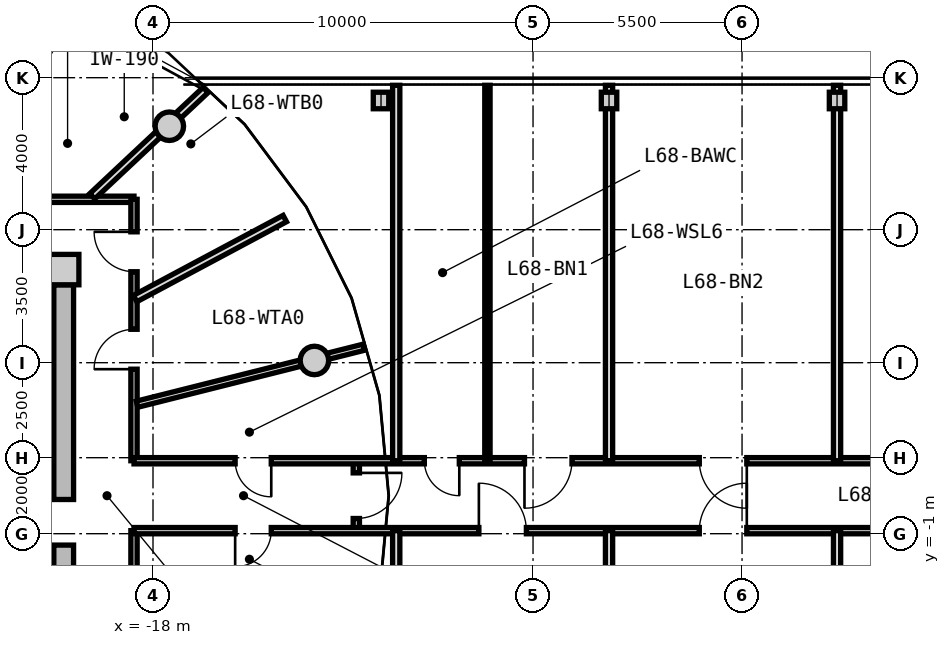
"""IFC4 building model, lengths in metres.
Left out: names, types, materials, properties, quantities, classifications, styles, units other than length and angle.
Written with IfcOpenShell. Run it as: python <this file> out.ifc"""

import sys

from ifc_helpers import new_model, si_unit, direction, frame, frame_2d, origin, origin_2d, place, context, subcontext, project, spatial, rectangle, circle, i_section, extrude, source, transform, mapped, element, fill, save


model = new_model("IFC4")
c1 = context("Model", 3, precision=1e-05, world=origin(), true_north=direction((0.0, 1.0)))
c2 = subcontext(c1, "Body", "Model", "MODEL_VIEW")
j1 = project(units=[si_unit("LENGTHUNIT", "METRE"), si_unit("PLANEANGLEUNIT", "RADIAN")], contexts=[c1])
p1 = place(None, origin())
s1 = spatial("IfcSite", under=j1, at=p1, CompositionType="ELEMENT")
p2 = place(p1, origin())
s2 = spatial("IfcBuilding", under=s1, at=p2, CompositionType="ELEMENT")
p3 = place(p2, frame((0.0, 0.0, 220.0)))
s3 = spatial("IfcBuildingStorey", under=s2, at=p3, CompositionType="ELEMENT", Elevation=220.0)
m1 = source(origin(), c2, "Body", "SweptSolid", [
    extrude(rectangle(XDim=0.8, YDim=0.8, at=origin_2d()), origin(), (0.0, 0.0, 1.0), 3.05),
])
p4 = place(p3, frame((-20.35, 5.95, 0.0), z_axis=(0.0, 0.0, 1.0), x_axis=(1.0, 0.0, 0.0)))
e1 = element("IfcColumn", 1, at=p4, inside=s3, PredefinedType="COLUMN", context=c2, shape_type="MappedRepresentation", body=[
    mapped(m1, transform((0.0, 0.0, 0.0), x_axis=(1.0, 0.0, 0.0), y_axis=(0.0, 1.0, 0.0), z_axis=(0.0, 0.0, 1.0), scale=1.0)),
])
m2 = source(origin(), c2, "Body", "SweptSolid", [
    extrude(rectangle(XDim=11.1, YDim=0.52, at=frame_2d((5.55, 0.0))), origin(), (0.0, 0.0, 1.0), 2.76),
])
p5 = place(p3, frame((-20.35, 5.55, 0.0), z_axis=(0.0, 0.0, 1.0), x_axis=(0.0, -1.0, 0.0)))
e2 = element("IfcWall", 2, at=p5, inside=s3, PredefinedType="SHEAR", context=c2, shape_type="MappedRepresentation", body=[
    mapped(m2, transform((0.0, 0.0, 0.0), x_axis=(1.0, 0.0, 0.0), y_axis=(0.0, 1.0, 0.0), z_axis=(0.0, 0.0, 1.0), scale=1.0)),
])
p6 = place(p5, frame((5.65, 0.0, 0.0)))
e3 = element("IfcOpeningElement", 3, at=p6, cuts=e2, PredefinedType="OPENING", context=c2, shape_type="SweptSolid", body=[
    extrude(rectangle(XDim=1.2, YDim=2.15, at=frame_2d((0.6, 1.075))), frame((0.0, 0.27, 0.0), z_axis=(0.0, -1.0, 0.0), x_axis=(1.0, 0.0, 0.0)), (0.0, 0.0, 1.0), 0.54),
])
m3 = source(origin(), c2, "Body", "SweptSolid", [
    extrude(circle(Radius=0.375, at=origin_2d()), origin(), (0.0, 0.0, 1.0), 3.05),
])
for number, where, z_axis, x_axis in (
    (4, (-13.753, 3.559, 0.0), (0.0, 0.0, 1.0), (1.0, 0.0, 0.0)),
    (5, (-17.57, 9.723, 0.0), (0.0, 0.0, 1.0), (1.0, 0.0, 0.0)),
):
    element("IfcColumn", number, at=place(p3, frame(where, z_axis=z_axis, x_axis=x_axis)), inside=s3, PredefinedType="COLUMN", context=c2, shape_type="MappedRepresentation", body=[
        mapped(m3, transform((0.0, 0.0, 0.0), x_axis=(1.0, 0.0, 0.0), y_axis=(0.0, 1.0, 0.0), z_axis=(0.0, 0.0, 1.0), scale=1.0)),
    ])
m4 = source(origin(), c2, "Body", "SweptSolid", [
    extrude(i_section(OverallWidth=0.407, OverallDepth=0.435, WebThickness=0.024, FlangeThickness=0.039, FilletRadius=0.015, at=origin_2d()), origin(), (0.0, 0.0, 1.0), 3.05),
])
for number, where, z_axis, x_axis in (
    (6, (-12.0, 10.4, 0.0), (0.0, 0.0, 1.0), (1.0, 0.0, 0.0)),
    (7, (-6.0, 10.4, 0.0), (0.0, 0.0, 1.0), (1.0, 0.0, 0.0)),
    (8, (0.0, 10.4, 0.0), (0.0, 0.0, 1.0), (1.0, 0.0, 0.0)),
):
    element("IfcColumn", number, at=place(p3, frame(where, z_axis=z_axis, x_axis=x_axis)), inside=s3, PredefinedType="COLUMN", context=c2, shape_type="MappedRepresentation", body=[
        mapped(m4, transform((0.0, 0.0, 0.0), x_axis=(1.0, 0.0, 0.0), y_axis=(0.0, 1.0, 0.0), z_axis=(0.0, 0.0, 1.0), scale=1.0)),
    ])
m5 = source(origin(), c2, "Body", "SweptSolid", [
    extrude(rectangle(XDim=8.58, YDim=0.165, at=frame_2d((4.29, 0.0))), origin(), (0.0, 0.0, 1.0), 2.745),
])
p7 = place(p3, frame((-27.08, 7.8, 0.0), z_axis=(0.0, 0.0, 1.0), x_axis=(1.0, 0.0, 0.0)))
e9 = element("IfcWall", 9, at=p7, inside=s3, PredefinedType="PARTITIONING", context=c2, shape_type="MappedRepresentation", body=[
    mapped(m5, transform((0.0, 0.0, 0.0), x_axis=(1.0, 0.0, 0.0), y_axis=(0.0, 1.0, 0.0), z_axis=(0.0, 0.0, 1.0), scale=1.0)),
])
p8 = place(p7, frame((5.166, 0.0, 0.0)))
e10 = element("IfcOpeningElement", 10, at=p8, cuts=e9, PredefinedType="OPENING", context=c2, shape_type="SweptSolid", body=[
    extrude(rectangle(XDim=1.05, YDim=2.15, at=frame_2d((0.525, 1.075))), frame((0.0, 0.093, 0.0), z_axis=(0.0, -1.0, 0.0), x_axis=(1.0, 0.0, 0.0)), (0.0, 0.0, 1.0), 0.185),
])
p9 = place(p7, frame((2.076, 0.0, 0.0)))
e11 = element("IfcOpeningElement", 11, at=p9, cuts=e9, PredefinedType="OPENING", context=c2, shape_type="SweptSolid", body=[
    extrude(rectangle(XDim=1.05, YDim=2.15, at=frame_2d((0.525, 1.075))), frame((0.0, 0.093, 0.0), z_axis=(0.0, -1.0, 0.0), x_axis=(1.0, 0.0, 0.0)), (0.0, 0.0, 1.0), 0.185),
])
m6 = source(origin(), c2, "Body", "SweptSolid", [
    extrude(rectangle(XDim=6.88, YDim=0.165, at=frame_2d((3.44, 0.0))), origin(), (0.0, 0.0, 1.0), 2.745),
])
p10 = place(p3, frame((-18.5, 7.8, 0.0), z_axis=(0.0, 0.0, 1.0), x_axis=(0.0, -1.0, 0.0)))
e12 = element("IfcWall", 12, at=p10, inside=s3, PredefinedType="PARTITIONING", context=c2, shape_type="MappedRepresentation", body=[
    mapped(m6, transform((0.0, 0.0, 0.0), x_axis=(1.0, 0.0, 0.0), y_axis=(0.0, 1.0, 0.0), z_axis=(0.0, 0.0, 1.0), scale=1.0)),
])
p11 = place(p10, frame((3.421, 0.0, 0.0)))
e13 = element("IfcOpeningElement", 13, at=p11, cuts=e12, PredefinedType="OPENING", context=c2, shape_type="SweptSolid", body=[
    extrude(rectangle(XDim=1.05, YDim=2.15, at=frame_2d((0.525, 1.075))), frame((0.0, 0.093, 0.0), z_axis=(0.0, -1.0, 0.0), x_axis=(1.0, 0.0, 0.0)), (0.0, 0.0, 1.0), 0.185),
])
p12 = place(p10, frame((0.856, 0.0, 0.0)))
e14 = element("IfcOpeningElement", 14, at=p12, cuts=e12, PredefinedType="OPENING", context=c2, shape_type="SweptSolid", body=[
    extrude(rectangle(XDim=1.05, YDim=2.15, at=frame_2d((0.525, 1.075))), frame((0.0, 0.093, 0.0), z_axis=(0.0, -1.0, 0.0), x_axis=(1.0, 0.0, 0.0)), (0.0, 0.0, 1.0), 0.185),
])
p13 = place(p3, frame((-18.5, -0.92, 0.0), z_axis=(0.0, 0.0, 1.0), x_axis=(0.0, -1.0, 0.0)))
e15 = element("IfcWall", 15, at=p13, inside=s3, PredefinedType="PARTITIONING", context=c2, shape_type="MappedRepresentation", body=[
    mapped(m6, transform((0.0, 0.0, 0.0), x_axis=(1.0, 0.0, 0.0), y_axis=(0.0, 1.0, 0.0), z_axis=(0.0, 0.0, 1.0), scale=1.0)),
])
p14 = place(p13, frame((3.464, 0.0, 0.0)))
e16 = element("IfcOpeningElement", 16, at=p14, cuts=e15, PredefinedType="OPENING", context=c2, shape_type="SweptSolid", body=[
    extrude(rectangle(XDim=1.25, YDim=2.2, at=frame_2d((0.625, 1.1))), frame((0.0, 0.093, 0.0), z_axis=(0.0, -1.0, 0.0), x_axis=(1.0, 0.0, 0.0)), (0.0, 0.0, 1.0), 0.185),
])
m7 = source(origin(), c2, "Body", "SweptSolid", [
    extrude(rectangle(XDim=6.157, YDim=0.165, at=frame_2d((3.079, 0.0))), origin(), (0.0, 0.0, 1.0), 2.345),
])
p15 = place(p3, frame((-18.42, 2.407, 0.0), z_axis=(0.0, 0.0, 1.0), x_axis=(0.969840867184, 0.243738984038, 0.0)))
e17 = element("IfcWall", 17, at=p15, inside=s3, PredefinedType="PARTITIONING", context=c2, shape_type="MappedRepresentation", body=[
    mapped(m7, transform((0.0, 0.0, 0.0), x_axis=(1.0, 0.0, 0.0), y_axis=(0.0, 1.0, 0.0), z_axis=(0.0, 0.0, 1.0), scale=1.0)),
])
m8 = source(origin(), c2, "Body", "SweptSolid", [
    extrude(rectangle(XDim=4.089, YDim=0.19, at=frame_2d((2.044, 0.0))), origin(), (0.0, 0.0, 1.0), 2.345),
])
p16 = place(p3, frame((-19.598, 7.88, 0.0), z_axis=(0.0, 0.0, 1.0), x_axis=(0.729401273609, 0.684086092577, 0.0)))
e18 = element("IfcWall", 18, at=p16, inside=s3, PredefinedType="PARTITIONING", context=c2, shape_type="MappedRepresentation", body=[
    mapped(m8, transform((0.0, 0.0, 0.0), x_axis=(1.0, 0.0, 0.0), y_axis=(0.0, 1.0, 0.0), z_axis=(0.0, 0.0, 1.0), scale=1.0)),
])
m9 = source(origin(), c2, "Body", "SweptSolid", [
    extrude(rectangle(XDim=4.465, YDim=0.19, at=frame_2d((2.232, 0.0))), origin(), (0.0, 0.0, 1.0), 2.745),
])
p17 = place(p3, frame((-18.47, 5.188, 0.0), z_axis=(0.0, 0.0, 1.0), x_axis=(0.881981829834, 0.471283409259, 0.0)))
e19 = element("IfcWall", 19, at=p17, inside=s3, PredefinedType="PARTITIONING", context=c2, shape_type="MappedRepresentation", body=[
    mapped(m9, transform((0.0, 0.0, 0.0), x_axis=(1.0, 0.0, 0.0), y_axis=(0.0, 1.0, 0.0), z_axis=(0.0, 0.0, 1.0), scale=1.0)),
])
m10 = source(origin(), c2, "Body", "SweptSolid", [
    extrude(rectangle(XDim=5.652, YDim=0.19, at=frame_2d((2.826, 0.0))), origin(), (0.0, 0.0, 1.0), 2.745),
])
p18 = place(p3, frame((-23.206, 7.83, 0.0), z_axis=(0.0, 0.0, 1.0), x_axis=(0.527566076956, 0.84951399897, 0.0)))
e20 = element("IfcWall", 20, at=p18, inside=s3, PredefinedType="PARTITIONING", context=c2, shape_type="MappedRepresentation", body=[
    mapped(m10, transform((0.0, 0.0, 0.0), x_axis=(1.0, 0.0, 0.0), y_axis=(0.0, 1.0, 0.0), z_axis=(0.0, 0.0, 1.0), scale=1.0)),
])
m11 = source(origin(), c2, "Body", "SweptSolid", [
    extrude(rectangle(XDim=1.84, YDim=0.165, at=frame_2d((0.92, 0.0))), origin(), (0.0, 0.0, 1.0), 2.745),
])
p19 = place(p3, frame((-12.65, -0.92, 0.0), z_axis=(0.0, 0.0, 1.0), x_axis=(0.0, 1.0, 0.0)))
e21 = element("IfcWall", 21, at=p19, inside=s3, PredefinedType="PARTITIONING", context=c2, shape_type="MappedRepresentation", body=[
    mapped(m11, transform((0.0, 0.0, 0.0), x_axis=(1.0, 0.0, 0.0), y_axis=(0.0, 1.0, 0.0), z_axis=(0.0, 0.0, 1.0), scale=1.0)),
])
p20 = place(p19, frame((0.32, 0.0, 0.0)))
e22 = element("IfcOpeningElement", 22, at=p20, cuts=e21, PredefinedType="OPENING", context=c2, shape_type="SweptSolid", body=[
    extrude(rectangle(XDim=1.2, YDim=2.15, at=frame_2d((0.6, 1.075))), frame((0.0, 0.093, 0.0), z_axis=(0.0, -1.0, 0.0), x_axis=(1.0, 0.0, 0.0)), (0.0, 0.0, 1.0), 0.185),
])
m12 = source(origin(), c2, "Body", "SweptSolid", [
    extrude(rectangle(XDim=37.0, YDim=0.165, at=frame_2d((18.5, 0.0))), origin(), (0.0, 0.0, 1.0), 2.745),
])
p21 = place(p3, frame((-18.5, -0.92, 0.0), z_axis=(0.0, 0.0, 1.0), x_axis=(1.0, 0.0, 0.0)))
e23 = element("IfcWall", 23, at=p21, inside=s3, PredefinedType="PARTITIONING", context=c2, shape_type="MappedRepresentation", body=[
    mapped(m12, transform((0.0, 0.0, 0.0), x_axis=(1.0, 0.0, 0.0), y_axis=(0.0, 1.0, 0.0), z_axis=(0.0, 0.0, 1.0), scale=1.0)),
])
p22 = place(p21, frame((2.662, 0.0, 0.0)))
e24 = element("IfcOpeningElement", 24, at=p22, cuts=e23, PredefinedType="OPENING", context=c2, shape_type="SweptSolid", body=[
    extrude(rectangle(XDim=0.95, YDim=2.1, at=frame_2d((0.475, 1.05))), frame((0.0, 0.093, 0.0), z_axis=(0.0, -1.0, 0.0), x_axis=(1.0, 0.0, 0.0)), (0.0, 0.0, 1.0), 0.185),
])
p23 = place(p21, frame((33.388, 0.0, 0.0)))
e25 = element("IfcOpeningElement", 25, at=p23, cuts=e23, PredefinedType="OPENING", context=c2, shape_type="SweptSolid", body=[
    extrude(rectangle(XDim=0.95, YDim=2.1, at=frame_2d((0.475, 1.05))), frame((0.0, 0.093, 0.0), z_axis=(0.0, -1.0, 0.0), x_axis=(1.0, 0.0, 0.0)), (0.0, 0.0, 1.0), 0.185),
])
p24 = place(p21, frame((9.075, 0.0, 0.0)))
e26 = element("IfcOpeningElement", 26, at=p24, cuts=e23, PredefinedType="OPENING", context=c2, shape_type="SweptSolid", body=[
    extrude(rectangle(XDim=1.25, YDim=2.2, at=frame_2d((0.625, 1.1))), frame((0.0, 0.093, 0.0), z_axis=(0.0, -1.0, 0.0), x_axis=(1.0, 0.0, 0.0)), (0.0, 0.0, 1.0), 0.185),
])
p25 = place(p21, frame((14.875, 0.0, 0.0)))
e27 = element("IfcOpeningElement", 27, at=p25, cuts=e23, PredefinedType="OPENING", context=c2, shape_type="SweptSolid", body=[
    extrude(rectangle(XDim=1.25, YDim=2.2, at=frame_2d((0.625, 1.1))), frame((0.0, 0.093, 0.0), z_axis=(0.0, -1.0, 0.0), x_axis=(1.0, 0.0, 0.0)), (0.0, 0.0, 1.0), 0.185),
])
p26 = place(p21, frame((23.03, 0.0, 0.0)))
e28 = element("IfcOpeningElement", 28, at=p26, cuts=e23, PredefinedType="OPENING", context=c2, shape_type="SweptSolid", body=[
    extrude(rectangle(XDim=1.25, YDim=2.2, at=frame_2d((0.625, 1.1))), frame((0.0, 0.093, 0.0), z_axis=(0.0, -1.0, 0.0), x_axis=(1.0, 0.0, 0.0)), (0.0, 0.0, 1.0), 0.185),
])
p27 = place(p3, frame((-18.5, 0.92, 0.0), z_axis=(0.0, 0.0, 1.0), x_axis=(1.0, 0.0, 0.0)))
e29 = element("IfcWall", 29, at=p27, inside=s3, PredefinedType="PARTITIONING", context=c2, shape_type="MappedRepresentation", body=[
    mapped(m12, transform((0.0, 0.0, 0.0), x_axis=(1.0, 0.0, 0.0), y_axis=(0.0, 1.0, 0.0), z_axis=(0.0, 0.0, 1.0), scale=1.0)),
])
p28 = place(p27, frame((2.662, 0.0, 0.0)))
e30 = element("IfcOpeningElement", 30, at=p28, cuts=e29, PredefinedType="OPENING", context=c2, shape_type="SweptSolid", body=[
    extrude(rectangle(XDim=0.95, YDim=2.1, at=frame_2d((0.475, 1.05))), frame((0.0, 0.093, 0.0), z_axis=(0.0, -1.0, 0.0), x_axis=(1.0, 0.0, 0.0)), (0.0, 0.0, 1.0), 0.185),
])
p29 = place(p27, frame((33.388, 0.0, 0.0)))
e31 = element("IfcOpeningElement", 31, at=p29, cuts=e29, PredefinedType="OPENING", context=c2, shape_type="SweptSolid", body=[
    extrude(rectangle(XDim=0.95, YDim=2.1, at=frame_2d((0.475, 1.05))), frame((0.0, 0.093, 0.0), z_axis=(0.0, -1.0, 0.0), x_axis=(1.0, 0.0, 0.0)), (0.0, 0.0, 1.0), 0.185),
])
p30 = place(p27, frame((7.64, 0.0, 0.0)))
e32 = element("IfcOpeningElement", 32, at=p30, cuts=e29, PredefinedType="OPENING", context=c2, shape_type="SweptSolid", body=[
    extrude(rectangle(XDim=0.92, YDim=2.1, at=frame_2d((0.46, 1.05))), frame((0.0, 0.093, 0.0), z_axis=(0.0, -1.0, 0.0), x_axis=(1.0, 0.0, 0.0)), (0.0, 0.0, 1.0), 0.185),
])
p31 = place(p27, frame((10.275, 0.0, 0.0)))
e33 = element("IfcOpeningElement", 33, at=p31, cuts=e29, PredefinedType="OPENING", context=c2, shape_type="SweptSolid", body=[
    extrude(rectangle(XDim=1.25, YDim=2.2, at=frame_2d((0.625, 1.1))), frame((0.0, 0.093, 0.0), z_axis=(0.0, -1.0, 0.0), x_axis=(1.0, 0.0, 0.0)), (0.0, 0.0, 1.0), 0.185),
])
p32 = place(p27, frame((14.875, 0.0, 0.0)))
e34 = element("IfcOpeningElement", 34, at=p32, cuts=e29, PredefinedType="OPENING", context=c2, shape_type="SweptSolid", body=[
    extrude(rectangle(XDim=1.25, YDim=2.2, at=frame_2d((0.625, 1.1))), frame((0.0, 0.093, 0.0), z_axis=(0.0, -1.0, 0.0), x_axis=(1.0, 0.0, 0.0)), (0.0, 0.0, 1.0), 0.185),
])
p33 = place(p27, frame((23.03, 0.0, 0.0)))
e35 = element("IfcOpeningElement", 35, at=p33, cuts=e29, PredefinedType="OPENING", context=c2, shape_type="SweptSolid", body=[
    extrude(rectangle(XDim=1.25, YDim=2.2, at=frame_2d((0.625, 1.1))), frame((0.0, 0.093, 0.0), z_axis=(0.0, -1.0, 0.0), x_axis=(1.0, 0.0, 0.0)), (0.0, 0.0, 1.0), 0.185),
])
m13 = source(origin(), c2, "Body", "SweptSolid", [
    extrude(rectangle(XDim=9.88, YDim=0.19, at=frame_2d((4.94, 0.0))), origin(), (0.0, 0.0, 1.0), 2.745),
])
for number, where, z_axis, x_axis in (
    (36, (-11.6, -10.8, 0.0), (0.0, 0.0, 1.0), (0.0, 1.0, 0.0)),
    (37, (-11.6, 0.92, 0.0), (0.0, 0.0, 1.0), (0.0, 1.0, 0.0)),
):
    element("IfcWall", number, at=place(p3, frame(where, z_axis=z_axis, x_axis=x_axis)), inside=s3, PredefinedType="PARTITIONING", context=c2, shape_type="MappedRepresentation", body=[
        mapped(m13, transform((0.0, 0.0, 0.0), x_axis=(1.0, 0.0, 0.0), y_axis=(0.0, 1.0, 0.0), z_axis=(0.0, 0.0, 1.0), scale=1.0)),
    ])
m14 = source(origin(), c2, "Body", "SweptSolid", [
    extrude(rectangle(XDim=9.88, YDim=0.19, at=frame_2d((4.94, 0.0))), origin(), (0.0, 0.0, 1.0), 2.045),
])
for number, where, z_axis, x_axis in (
    (38, (-6.0, -10.8, 0.0), (0.0, 0.0, 1.0), (0.0, 1.0, 0.0)),
    (39, (-6.0, 0.92, 0.0), (0.0, 0.0, 1.0), (0.0, 1.0, 0.0)),
):
    element("IfcWall", number, at=place(p3, frame(where, z_axis=z_axis, x_axis=x_axis)), inside=s3, PredefinedType="PARTITIONING", context=c2, shape_type="MappedRepresentation", body=[
        mapped(m14, transform((0.0, 0.0, 0.0), x_axis=(1.0, 0.0, 0.0), y_axis=(0.0, 1.0, 0.0), z_axis=(0.0, 0.0, 1.0), scale=1.0)),
    ])
m15 = source(origin(), c2, "Body", "SweptSolid", [
    extrude(rectangle(XDim=9.88, YDim=0.14, at=frame_2d((4.94, 0.0))), origin(), (0.0, 0.0, 1.0), 2.745),
])
p34 = place(p3, frame((-9.2, 0.92, 0.0), z_axis=(0.0, 0.0, 1.0), x_axis=(0.0, 1.0, 0.0)))
e40 = element("IfcWall", 40, at=p34, inside=s3, PredefinedType="PARTITIONING", context=c2, shape_type="MappedRepresentation", body=[
    mapped(m15, transform((0.0, 0.0, 0.0), x_axis=(1.0, 0.0, 0.0), y_axis=(0.0, 1.0, 0.0), z_axis=(0.0, 0.0, 1.0), scale=1.0)),
])
for number, where, z_axis, x_axis in (
    (41, (0.0, -10.8, 0.0), (0.0, 0.0, 1.0), (0.0, 1.0, 0.0)),
    (42, (0.0, 0.92, 0.0), (0.0, 0.0, 1.0), (0.0, 1.0, 0.0)),
):
    element("IfcWall", number, at=place(p3, frame(where, z_axis=z_axis, x_axis=x_axis)), inside=s3, PredefinedType="PARTITIONING", context=c2, shape_type="MappedRepresentation", body=[
        mapped(m14, transform((0.0, 0.0, 0.0), x_axis=(1.0, 0.0, 0.0), y_axis=(0.0, 1.0, 0.0), z_axis=(0.0, 0.0, 1.0), scale=1.0)),
    ])
m16 = source(origin(), c2, "Body", "SweptSolid", [
    extrude(rectangle(XDim=1.2, YDim=2.15, at=frame_2d((0.6, 1.075))), frame((0.0, 0.025, 0.0), z_axis=(0.0, -1.0, 0.0), x_axis=(1.0, 0.0, 0.0)), (0.0, 0.0, 1.0), 0.05),
])
p35 = place(p6, frame((1.2, 0.0, 0.0), z_axis=(0.0, 0.0, 1.0), x_axis=(-1.0, 0.0, 0.0)))
e43 = element("IfcDoor", 43, at=p35, inside=s3, OperationType="SINGLE_SWING_RIGHT", PredefinedType="DOOR", context=c2, shape_type="MappedRepresentation", body=[
    mapped(m16, transform((0.0, 0.0, 0.0), x_axis=(1.0, 0.0, 0.0), y_axis=(0.0, 1.0, 0.0), z_axis=(0.0, 0.0, 1.0), scale=1.0)),
])
fill(e3, e43)
m17 = source(origin(), c2, "Body", "SweptSolid", [
    extrude(rectangle(XDim=0.95, YDim=2.1, at=frame_2d((0.475, 1.05))), frame((0.0, 0.025, 0.0), z_axis=(0.0, -1.0, 0.0), x_axis=(1.0, 0.0, 0.0)), (0.0, 0.0, 1.0), 0.05),
])
p36 = place(p22, frame((0.95, 0.0, 0.0), z_axis=(0.0, 0.0, 1.0), x_axis=(-1.0, 0.0, 0.0)))
e44 = element("IfcDoor", 44, at=p36, inside=s3, OperationType="SINGLE_SWING_RIGHT", PredefinedType="DOOR", context=c2, shape_type="MappedRepresentation", body=[
    mapped(m17, transform((0.0, 0.0, 0.0), x_axis=(1.0, 0.0, 0.0), y_axis=(0.0, 1.0, 0.0), z_axis=(0.0, 0.0, 1.0), scale=1.0)),
])
fill(e24, e44)
p37 = place(p28, frame((0.95, 0.0, 0.0), z_axis=(0.0, 0.0, 1.0), x_axis=(-1.0, 0.0, 0.0)))
e45 = element("IfcDoor", 45, at=p37, inside=s3, OperationType="SINGLE_SWING_LEFT", PredefinedType="DOOR", context=c2, shape_type="MappedRepresentation", body=[
    mapped(m17, transform((0.0, 0.0, 0.0), x_axis=(1.0, 0.0, 0.0), y_axis=(0.0, 1.0, 0.0), z_axis=(0.0, 0.0, 1.0), scale=1.0)),
])
fill(e30, e45)
m18 = source(origin(), c2, "Body", "SweptSolid", [
    extrude(rectangle(XDim=1.05, YDim=2.15, at=frame_2d((0.525, 1.075))), frame((0.0, 0.025, 0.0), z_axis=(0.0, -1.0, 0.0), x_axis=(1.0, 0.0, 0.0)), (0.0, 0.0, 1.0), 0.05),
])
p38 = place(p11, frame((1.05, 0.0, 0.0), z_axis=(0.0, 0.0, 1.0), x_axis=(-1.0, 0.0, 0.0)))
e46 = element("IfcDoor", 46, at=p38, inside=s3, OperationType="SINGLE_SWING_LEFT", PredefinedType="DOOR", context=c2, shape_type="MappedRepresentation", body=[
    mapped(m18, transform((0.0, 0.0, 0.0), x_axis=(1.0, 0.0, 0.0), y_axis=(0.0, 1.0, 0.0), z_axis=(0.0, 0.0, 1.0), scale=1.0)),
])
fill(e13, e46)
p39 = place(p12, frame((1.05, 0.0, 0.0), z_axis=(0.0, 0.0, 1.0), x_axis=(-1.0, 0.0, 0.0)))
e47 = element("IfcDoor", 47, at=p39, inside=s3, OperationType="SINGLE_SWING_RIGHT", PredefinedType="DOOR", context=c2, shape_type="MappedRepresentation", body=[
    mapped(m18, transform((0.0, 0.0, 0.0), x_axis=(1.0, 0.0, 0.0), y_axis=(0.0, 1.0, 0.0), z_axis=(0.0, 0.0, 1.0), scale=1.0)),
])
fill(e14, e47)
p40 = place(p20, frame((1.2, 0.0, 0.0), z_axis=(0.0, 0.0, 1.0), x_axis=(-1.0, 0.0, 0.0)))
e48 = element("IfcDoor", 48, at=p40, inside=s3, OperationType="SINGLE_SWING_LEFT", PredefinedType="DOOR", context=c2, shape_type="MappedRepresentation", body=[
    mapped(m16, transform((0.0, 0.0, 0.0), x_axis=(1.0, 0.0, 0.0), y_axis=(0.0, 1.0, 0.0), z_axis=(0.0, 0.0, 1.0), scale=1.0)),
])
fill(e22, e48)
m19 = source(origin(), c2, "Body", "SweptSolid", [
    extrude(rectangle(XDim=1.25, YDim=2.2, at=frame_2d((0.625, 1.1))), frame((0.0, 0.025, 0.0), z_axis=(0.0, -1.0, 0.0), x_axis=(1.0, 0.0, 0.0)), (0.0, 0.0, 1.0), 0.05),
])
p41 = place(p24, origin())
e49 = element("IfcDoor", 49, at=p41, inside=s3, OperationType="SINGLE_SWING_LEFT", PredefinedType="DOOR", context=c2, shape_type="MappedRepresentation", body=[
    mapped(m19, transform((0.0, 0.0, 0.0), x_axis=(1.0, 0.0, 0.0), y_axis=(0.0, 1.0, 0.0), z_axis=(0.0, 0.0, 1.0), scale=1.0)),
])
fill(e26, e49)
m20 = source(origin(), c2, "Body", "SweptSolid", [
    extrude(rectangle(XDim=0.92, YDim=2.1, at=frame_2d((0.46, 1.05))), frame((0.0, 0.025, 0.0), z_axis=(0.0, -1.0, 0.0), x_axis=(1.0, 0.0, 0.0)), (0.0, 0.0, 1.0), 0.05),
])
p42 = place(p30, frame((0.92, 0.0, 0.0), z_axis=(0.0, 0.0, 1.0), x_axis=(-1.0, 0.0, 0.0)))
e50 = element("IfcDoor", 50, at=p42, inside=s3, OperationType="SINGLE_SWING_LEFT", PredefinedType="DOOR", context=c2, shape_type="MappedRepresentation", body=[
    mapped(m20, transform((0.0, 0.0, 0.0), x_axis=(1.0, 0.0, 0.0), y_axis=(0.0, 1.0, 0.0), z_axis=(0.0, 0.0, 1.0), scale=1.0)),
])
fill(e32, e50)
p43 = place(p31, frame((1.25, 0.0, 0.0), z_axis=(0.0, 0.0, 1.0), x_axis=(-1.0, 0.0, 0.0)))
e51 = element("IfcDoor", 51, at=p43, inside=s3, OperationType="SINGLE_SWING_RIGHT", PredefinedType="DOOR", context=c2, shape_type="MappedRepresentation", body=[
    mapped(m19, transform((0.0, 0.0, 0.0), x_axis=(1.0, 0.0, 0.0), y_axis=(0.0, 1.0, 0.0), z_axis=(0.0, 0.0, 1.0), scale=1.0)),
])
fill(e33, e51)
p44 = place(p25, origin())
e52 = element("IfcDoor", 52, at=p44, inside=s3, OperationType="SINGLE_SWING_RIGHT", PredefinedType="DOOR", context=c2, shape_type="MappedRepresentation", body=[
    mapped(m19, transform((0.0, 0.0, 0.0), x_axis=(1.0, 0.0, 0.0), y_axis=(0.0, 1.0, 0.0), z_axis=(0.0, 0.0, 1.0), scale=1.0)),
])
fill(e27, e52)
p45 = place(p32, frame((1.25, 0.0, 0.0), z_axis=(0.0, 0.0, 1.0), x_axis=(-1.0, 0.0, 0.0)))
e53 = element("IfcDoor", 53, at=p45, inside=s3, OperationType="SINGLE_SWING_LEFT", PredefinedType="DOOR", context=c2, shape_type="MappedRepresentation", body=[
    mapped(m19, transform((0.0, 0.0, 0.0), x_axis=(1.0, 0.0, 0.0), y_axis=(0.0, 1.0, 0.0), z_axis=(0.0, 0.0, 1.0), scale=1.0)),
])
fill(e34, e53)
save(model, sys.argv[1])
